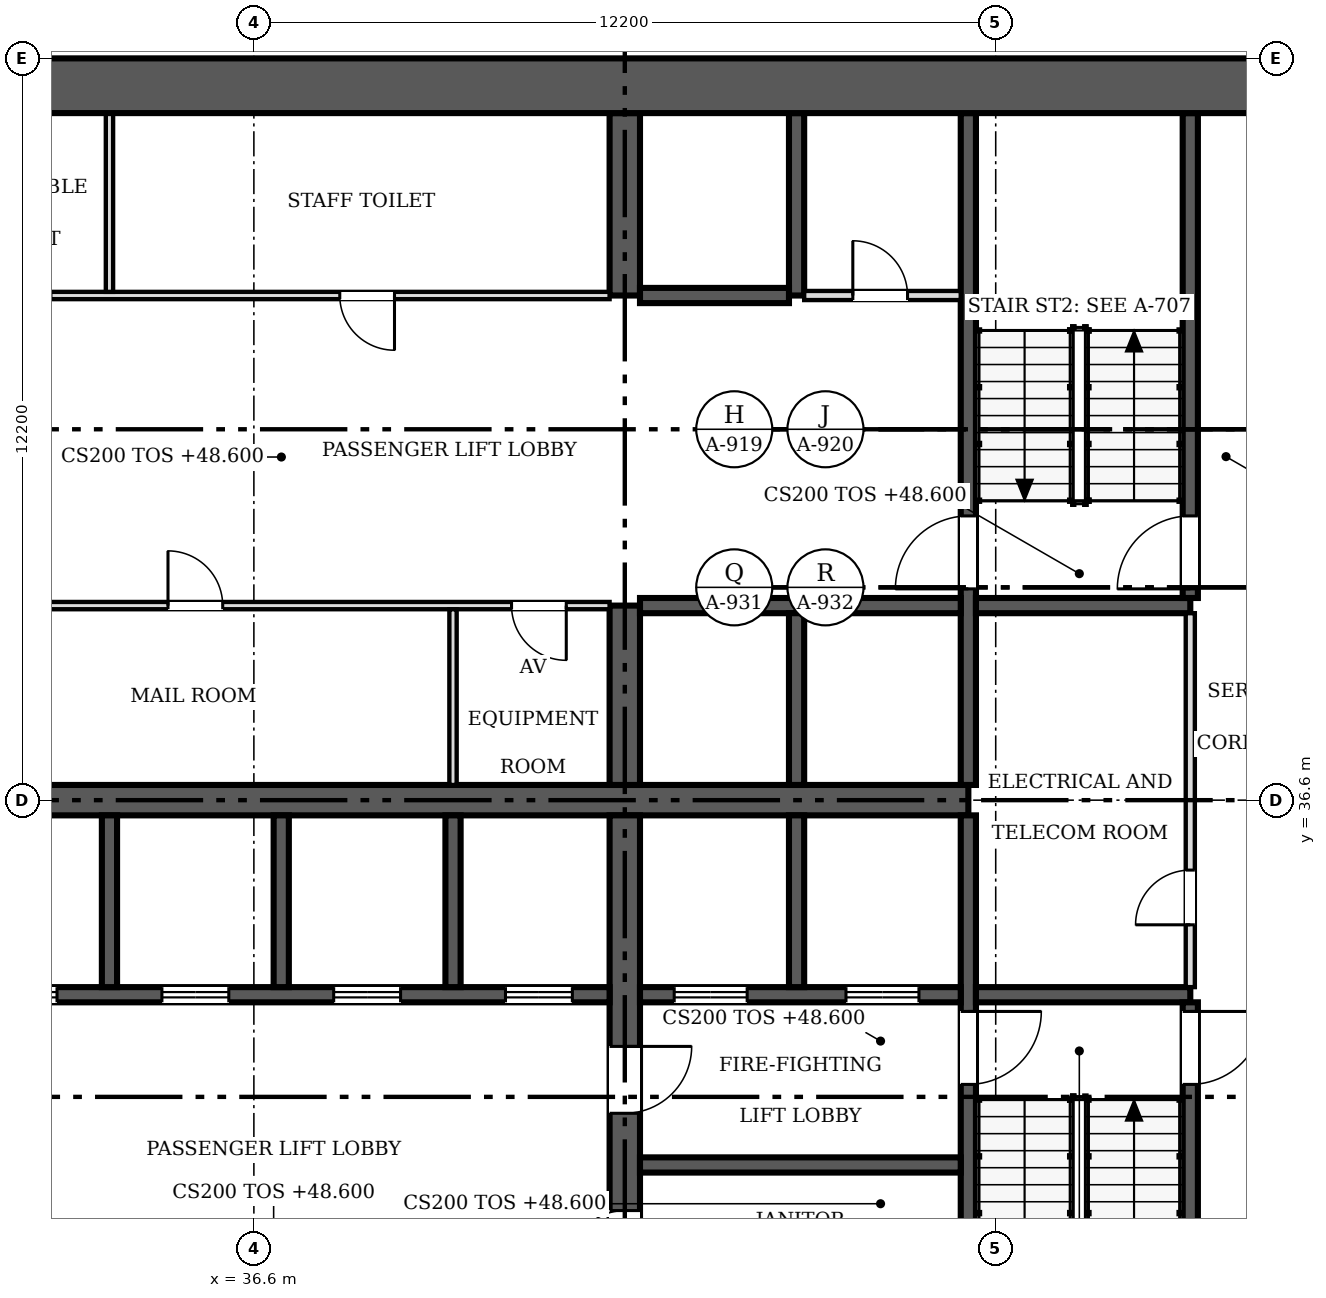
"""IFC4 building model, lengths in metres.
Left out: names, types, materials, properties, quantities, classifications, styles, units other than length and angle.
Written with IfcOpenShell. Run it as: python <this file> out.ifc"""

import sys

from ifc_helpers import new_model, si_unit, direction, frame, frame_2d, origin, place, context, subcontext, project, spatial, rectangle, extrude, source, transform, mapped, element, fill, save


model = new_model("IFC4")
c1 = context("Model", 3, precision=1e-05, world=origin(), true_north=direction((0.0, 1.0)))
c2 = subcontext(c1, "Body", "Model", "MODEL_VIEW")
j1 = project(units=[si_unit("LENGTHUNIT", "METRE"), si_unit("PLANEANGLEUNIT", "RADIAN")], contexts=[c1])
p1 = place(None, origin())
s1 = spatial("IfcSite", under=j1, at=p1, CompositionType="ELEMENT")
p2 = place(p1, origin())
s2 = spatial("IfcBuilding", under=s1, at=p2, CompositionType="ELEMENT")
p3 = place(p2, frame((0.0, 0.0, 48.6)))
s3 = spatial("IfcBuildingStorey", under=s2, at=p3, CompositionType="ELEMENT", Elevation=48.6)
p4 = place(p3, frame((30.5, 48.35, 0.0), z_axis=(0.0, 0.0, 1.0), x_axis=(1.0, 0.0, 0.0)))
e1 = element("IfcWall", 1, at=p4, inside=s3, PredefinedType="SHEAR", context=c2, shape_type="SweptSolid", body=[
    extrude(rectangle(XDim=24.4, YDim=0.9, at=frame_2d((12.2, 0.0))), origin(), (0.0, 0.0, 1.0), 3.8),
])
p5 = place(p3, frame((31.4, 36.6, 0.0), z_axis=(0.0, 0.0, 1.0), x_axis=(1.0, 0.0, 0.0)))
e2 = element("IfcWall", 2, at=p5, inside=s3, PredefinedType="SHEAR", context=c2, shape_type="SweptSolid", body=[
    extrude(rectangle(XDim=16.95, YDim=0.5, at=frame_2d((8.475, 0.0))), origin(), (0.0, 0.0, 1.0), 3.8),
])
p6 = place(p3, frame((42.7, 36.35, 0.0), z_axis=(0.0, 0.0, 1.0), x_axis=(0.0, -1.0, 0.0)))
e3 = element("IfcWall", 3, at=p6, inside=s3, PredefinedType="SHEAR", context=c2, shape_type="SweptSolid", body=[
    extrude(rectangle(XDim=11.05, YDim=0.5, at=frame_2d((5.525, 0.0))), origin(), (0.0, 0.0, 1.0), 3.8),
])
m1 = source(origin(), c2, "Body", "SweptSolid", [
    extrude(rectangle(XDim=0.9, YDim=2.1, at=frame_2d((0.45, 1.05))), frame((0.0, 0.26, 0.0), z_axis=(0.0, -1.0, 0.0), x_axis=(1.0, 0.0, 0.0)), (0.0, 0.0, 1.0), 0.52),
])
p7 = place(p6, frame((6.5, 0.0, 0.0)))
e4 = element("IfcOpeningElement", 4, at=p7, cuts=e3, PredefinedType="OPENING", context=c2, shape_type="MappedRepresentation", body=[
    mapped(m1, transform((0.0, 0.0, 0.0), scale=1.0)),
])
m2 = source(origin(), c2, "Body", "SweptSolid", [
    extrude(rectangle(XDim=1.1, YDim=2.1, at=frame_2d((0.55, 1.05))), frame((0.0, 0.26, 0.0), z_axis=(0.0, -1.0, 0.0), x_axis=(1.0, 0.0, 0.0)), (0.0, 0.0, 1.0), 0.52),
])
p8 = place(p6, frame((3.8, 0.0, 0.0)))
e5 = element("IfcOpeningElement", 5, at=p8, cuts=e3, PredefinedType="OPENING", context=c2, shape_type="MappedRepresentation", body=[
    mapped(m2, transform((0.0, 0.0, 0.0), scale=1.0)),
])
p9 = place(p3, frame((42.7, 36.85, 0.0), z_axis=(0.0, 0.0, 1.0), x_axis=(0.0, 1.0, 0.0)))
e6 = element("IfcWall", 6, at=p9, inside=s3, PredefinedType="SHEAR", context=c2, shape_type="SweptSolid", body=[
    extrude(rectangle(XDim=2.95, YDim=0.5, at=frame_2d((1.475, 0.0))), origin(), (0.0, 0.0, 1.0), 3.8),
])
p10 = place(p3, frame((42.7, 44.9, 0.0), z_axis=(0.0, 0.0, 1.0), x_axis=(0.0, 1.0, 0.0)))
e7 = element("IfcWall", 7, at=p10, inside=s3, PredefinedType="SHEAR", context=c2, shape_type="SweptSolid", body=[
    extrude(rectangle(XDim=3.0, YDim=0.5, at=frame_2d((1.5, 0.0))), origin(), (0.0, 0.0, 1.0), 3.8),
])
p11 = place(p3, frame((48.35, 36.35, 0.0), z_axis=(0.0, 0.0, 1.0), x_axis=(0.0, -1.0, 0.0)))
e8 = element("IfcWall", 8, at=p11, inside=s3, PredefinedType="SOLIDWALL", context=c2, shape_type="SweptSolid", body=[
    extrude(rectangle(XDim=11.05, YDim=0.25, at=frame_2d((5.525, 0.0))), origin(), (0.0, 0.0, 1.0), 3.8),
])
m3 = source(origin(), c2, "Body", "SweptSolid", [
    extrude(rectangle(XDim=1.2, YDim=2.1, at=frame_2d((0.6, 1.05))), frame((0.0, 0.135, 0.0), z_axis=(0.0, -1.0, 0.0), x_axis=(1.0, 0.0, 0.0)), (0.0, 0.0, 1.0), 0.27),
])
p12 = place(p11, frame((3.225, 0.0, 0.0)))
e9 = element("IfcOpeningElement", 9, at=p12, cuts=e8, PredefinedType="OPENING", context=c2, shape_type="MappedRepresentation", body=[
    mapped(m3, transform((0.0, 0.0, 0.0), scale=1.0)),
])
p13 = place(p3, frame((48.35, 47.9, 0.0), z_axis=(0.0, 0.0, 1.0), x_axis=(0.0, -1.0, 0.0)))
e10 = element("IfcWall", 10, at=p13, inside=s3, PredefinedType="SOLIDWALL", context=c2, shape_type="SweptSolid", body=[
    extrude(rectangle(XDim=11.05, YDim=0.25, at=frame_2d((5.525, 0.0))), origin(), (0.0, 0.0, 1.0), 3.8),
])
p14 = place(p13, frame((6.625, 0.0, 0.0)))
e11 = element("IfcOpeningElement", 11, at=p14, cuts=e10, PredefinedType="OPENING", context=c2, shape_type="MappedRepresentation", body=[
    mapped(m3, transform((0.0, 0.0, 0.0), scale=1.0)),
])
p15 = place(p3, frame((42.45, 33.4, 0.0), z_axis=(0.0, 0.0, 1.0), x_axis=(-1.0, 0.0, 0.0)))
e12 = element("IfcWall", 12, at=p15, inside=s3, PredefinedType="SOLIDWALL", context=c2, shape_type="SweptSolid", body=[
    extrude(rectangle(XDim=11.05, YDim=0.25, at=frame_2d((5.525, 0.0))), origin(), (0.0, 0.0, 1.0), 3.8),
])
m4 = source(origin(), c2, "Body", "SweptSolid", [
    extrude(rectangle(XDim=1.1, YDim=2.1, at=frame_2d((0.55, 1.05))), frame((0.0, 0.135, 0.0), z_axis=(0.0, -1.0, 0.0), x_axis=(1.0, 0.0, 0.0)), (0.0, 0.0, 1.0), 0.27),
])
p16 = place(p15, frame((9.087, 0.0, 0.0)))
e13 = element("IfcOpeningElement", 13, at=p16, cuts=e12, PredefinedType="OPENING", context=c2, shape_type="MappedRepresentation", body=[
    mapped(m4, transform((0.0, 0.0, 0.0), scale=1.0)),
])
p17 = place(p15, frame((6.262, 0.0, 0.0)))
e14 = element("IfcOpeningElement", 14, at=p17, cuts=e12, PredefinedType="OPENING", context=c2, shape_type="MappedRepresentation", body=[
    mapped(m4, transform((0.0, 0.0, 0.0), scale=1.0)),
])
p18 = place(p15, frame((3.438, 0.0, 0.0)))
e15 = element("IfcOpeningElement", 15, at=p18, cuts=e12, PredefinedType="OPENING", context=c2, shape_type="MappedRepresentation", body=[
    mapped(m4, transform((0.0, 0.0, 0.0), scale=1.0)),
])
p19 = place(p15, frame((0.613, 0.0, 0.0)))
e16 = element("IfcOpeningElement", 16, at=p19, cuts=e12, PredefinedType="OPENING", context=c2, shape_type="MappedRepresentation", body=[
    mapped(m4, transform((0.0, 0.0, 0.0), scale=1.0)),
])
p20 = place(p3, frame((48.225, 33.4, 0.0), z_axis=(0.0, 0.0, 1.0), x_axis=(-1.0, 0.0, 0.0)))
e17 = element("IfcWall", 17, at=p20, inside=s3, PredefinedType="SOLIDWALL", context=c2, shape_type="SweptSolid", body=[
    extrude(rectangle(XDim=5.275, YDim=0.25, at=frame_2d((2.638, 0.0))), origin(), (0.0, 0.0, 1.0), 3.8),
])
p21 = place(p20, frame((3.512, 0.0, 0.0)))
e18 = element("IfcOpeningElement", 18, at=p21, cuts=e17, PredefinedType="OPENING", context=c2, shape_type="MappedRepresentation", body=[
    mapped(m3, transform((0.0, 0.0, 0.0), scale=1.0)),
])
p22 = place(p20, frame((0.688, 0.0, 0.0)))
e19 = element("IfcOpeningElement", 19, at=p22, cuts=e17, PredefinedType="OPENING", context=c2, shape_type="MappedRepresentation", body=[
    mapped(m3, transform((0.0, 0.0, 0.0), scale=1.0)),
])
p23 = place(p3, frame((48.475, 33.4, 0.0), z_axis=(0.0, 0.0, 1.0), x_axis=(1.0, 0.0, 0.0)))
e20 = element("IfcWall", 20, at=p23, inside=s3, PredefinedType="SOLIDWALL", context=c2, shape_type="SweptSolid", body=[
    extrude(rectangle(XDim=3.525, YDim=0.25, at=frame_2d((1.762, 0.0))), origin(), (0.0, 0.0, 1.0), 3.8),
])
p24 = place(p3, frame((42.95, 39.8, 0.0), z_axis=(0.0, 0.0, 1.0), x_axis=(1.0, 0.0, 0.0)))
e21 = element("IfcWall", 21, at=p24, inside=s3, PredefinedType="SOLIDWALL", context=c2, shape_type="SweptSolid", body=[
    extrude(rectangle(XDim=5.275, YDim=0.25, at=frame_2d((2.638, 0.0))), origin(), (0.0, 0.0, 1.0), 3.8),
])
p25 = place(p3, frame((48.475, 39.8, 0.0), z_axis=(0.0, 0.0, 1.0), x_axis=(1.0, 0.0, 0.0)))
e22 = element("IfcWall", 22, at=p25, inside=s3, PredefinedType="SOLIDWALL", context=c2, shape_type="SweptSolid", body=[
    extrude(rectangle(XDim=3.525, YDim=0.25, at=frame_2d((1.762, 0.0))), origin(), (0.0, 0.0, 1.0), 3.8),
])
p26 = place(p3, frame((52.0, 25.3, 0.0), z_axis=(0.0, 0.0, 1.0), x_axis=(0.0, 1.0, 0.0)))
e23 = element("IfcWall", 23, at=p26, inside=s3, PredefinedType="SOLIDWALL", context=c2, shape_type="SweptSolid", body=[
    extrude(rectangle(XDim=7.975, YDim=0.25, at=frame_2d((3.987, 0.0))), origin(), (0.0, 0.0, 1.0), 3.8),
])
p27 = place(p26, frame((6.625, 0.0, 0.0)))
e24 = element("IfcOpeningElement", 24, at=p27, cuts=e23, PredefinedType="OPENING", context=c2, shape_type="MappedRepresentation", body=[
    mapped(m3, transform((0.0, 0.0, 0.0), scale=1.0)),
])
p28 = place(p3, frame((52.0, 39.925, 0.0), z_axis=(0.0, 0.0, 1.0), x_axis=(0.0, 1.0, 0.0)))
e25 = element("IfcWall", 25, at=p28, inside=s3, PredefinedType="SOLIDWALL", context=c2, shape_type="SweptSolid", body=[
    extrude(rectangle(XDim=7.975, YDim=0.25, at=frame_2d((3.987, 0.0))), origin(), (0.0, 0.0, 1.0), 3.8),
])
p29 = place(p28, frame((0.15, 0.0, 0.0)))
e26 = element("IfcOpeningElement", 26, at=p29, cuts=e25, PredefinedType="OPENING", context=c2, shape_type="MappedRepresentation", body=[
    mapped(m3, transform((0.0, 0.0, 0.0), scale=1.0)),
])
p30 = place(p3, frame((45.525, 33.525, 0.0), z_axis=(0.0, 0.0, 1.0), x_axis=(0.0, 1.0, 0.0)))
e27 = element("IfcWall", 27, at=p30, inside=s3, PredefinedType="SOLIDWALL", context=c2, shape_type="SweptSolid", body=[
    extrude(rectangle(XDim=2.825, YDim=0.25, at=frame_2d((1.413, 0.0))), origin(), (0.0, 0.0, 1.0), 3.8),
])
p31 = place(p3, frame((45.525, 36.85, 0.0), z_axis=(0.0, 0.0, 1.0), x_axis=(0.0, 1.0, 0.0)))
e28 = element("IfcWall", 28, at=p31, inside=s3, PredefinedType="SOLIDWALL", context=c2, shape_type="SweptSolid", body=[
    extrude(rectangle(XDim=2.825, YDim=0.25, at=frame_2d((1.413, 0.0))), origin(), (0.0, 0.0, 1.0), 3.8),
])
p32 = place(p3, frame((42.95, 30.6, 0.0), z_axis=(0.0, 0.0, 1.0), x_axis=(1.0, 0.0, 0.0)))
e29 = element("IfcWall", 29, at=p32, inside=s3, PredefinedType="SOLIDWALL", context=c2, shape_type="SweptSolid", body=[
    extrude(rectangle(XDim=5.275, YDim=0.25, at=frame_2d((2.638, 0.0))), origin(), (0.0, 0.0, 1.0), 3.8),
])
for number, where, z_axis, x_axis in (
    (30, (34.225, 33.525, 0.0), (0.0, 0.0, 1.0), (0.0, 1.0, 0.0)),
    (31, (37.05, 33.525, 0.0), (0.0, 0.0, 1.0), (0.0, 1.0, 0.0)),
    (32, (39.875, 33.525, 0.0), (0.0, 0.0, 1.0), (0.0, 1.0, 0.0)),
):
    element("IfcWall", number, at=place(p3, frame(where, z_axis=z_axis, x_axis=x_axis)), inside=s3, PredefinedType="SOLIDWALL", context=c2, shape_type="SweptSolid", body=[
        extrude(rectangle(XDim=2.825, YDim=0.25, at=frame_2d((1.413, 0.0))), origin(), (0.0, 0.0, 1.0), 3.8),
    ])
p33 = place(p3, frame((45.525, 44.9, 0.0), z_axis=(0.0, 0.0, 1.0), x_axis=(0.0, 1.0, 0.0)))
e33 = element("IfcWall", 33, at=p33, inside=s3, PredefinedType="SOLIDWALL", context=c2, shape_type="SweptSolid", body=[
    extrude(rectangle(XDim=3.0, YDim=0.25, at=frame_2d((1.5, 0.0))), origin(), (0.0, 0.0, 1.0), 3.8),
])
p34 = place(p3, frame((42.95, 44.9, 0.0), z_axis=(0.0, 0.0, 1.0), x_axis=(1.0, 0.0, 0.0)))
e34 = element("IfcWall", 34, at=p34, inside=s3, PredefinedType="SOLIDWALL", context=c2, shape_type="SweptSolid", body=[
    extrude(rectangle(XDim=2.45, YDim=0.25, at=frame_2d((1.225, 0.0))), origin(), (0.0, 0.0, 1.0), 3.8),
])
p35 = place(p3, frame((42.45, 39.8, 0.0), z_axis=(0.0, 0.0, 1.0), x_axis=(-1.0, 0.0, 0.0)))
e35 = element("IfcWall", 35, at=p35, inside=s3, PredefinedType="PARTITIONING", context=c2, shape_type="SweptSolid", body=[
    extrude(rectangle(XDim=11.05, YDim=0.12, at=frame_2d((5.525, 0.0))), origin(), (0.0, 0.0, 1.0), 3.6),
])
m5 = source(origin(), c2, "Body", "SweptSolid", [
    extrude(rectangle(XDim=0.9, YDim=2.1, at=frame_2d((0.45, 1.05))), frame((0.0, 0.07, 0.0), z_axis=(0.0, -1.0, 0.0), x_axis=(1.0, 0.0, 0.0)), (0.0, 0.0, 1.0), 0.14),
])
p36 = place(p35, frame((6.363, 0.0, 0.0)))
e36 = element("IfcOpeningElement", 36, at=p36, cuts=e35, PredefinedType="OPENING", context=c2, shape_type="MappedRepresentation", body=[
    mapped(m5, transform((0.0, 0.0, 0.0), scale=1.0)),
])
p37 = place(p35, frame((0.712, 0.0, 0.0)))
e37 = element("IfcOpeningElement", 37, at=p37, cuts=e35, PredefinedType="OPENING", context=c2, shape_type="MappedRepresentation", body=[
    mapped(m5, transform((0.0, 0.0, 0.0), scale=1.0)),
])
p38 = place(p3, frame((31.4, 44.9, 0.0), z_axis=(0.0, 0.0, 1.0), x_axis=(1.0, 0.0, 0.0)))
e38 = element("IfcWall", 38, at=p38, inside=s3, PredefinedType="PARTITIONING", context=c2, shape_type="SweptSolid", body=[
    extrude(rectangle(XDim=11.05, YDim=0.12, at=frame_2d((5.525, 0.0))), origin(), (0.0, 0.0, 1.0), 3.6),
])
p39 = place(p38, frame((0.962, 0.0, 0.0)))
e39 = element("IfcOpeningElement", 39, at=p39, cuts=e38, PredefinedType="OPENING", context=c2, shape_type="MappedRepresentation", body=[
    mapped(m5, transform((0.0, 0.0, 0.0), scale=1.0)),
])
p40 = place(p38, frame((6.613, 0.0, 0.0)))
e40 = element("IfcOpeningElement", 40, at=p40, cuts=e38, PredefinedType="OPENING", context=c2, shape_type="MappedRepresentation", body=[
    mapped(m5, transform((0.0, 0.0, 0.0), scale=1.0)),
])
p41 = place(p3, frame((52.0, 33.525, 0.0), z_axis=(0.0, 0.0, 1.0), x_axis=(0.0, 1.0, 0.0)))
e41 = element("IfcWall", 41, at=p41, inside=s3, PredefinedType="PARTITIONING", context=c2, shape_type="SweptSolid", body=[
    extrude(rectangle(XDim=6.15, YDim=0.15, at=frame_2d((3.075, 0.0))), origin(), (0.0, 0.0, 1.0), 3.6),
])
m6 = source(origin(), c2, "Body", "SweptSolid", [
    extrude(rectangle(XDim=0.9, YDim=2.1, at=frame_2d((0.45, 1.05))), frame((0.0, 0.085, 0.0), z_axis=(0.0, -1.0, 0.0), x_axis=(1.0, 0.0, 0.0)), (0.0, 0.0, 1.0), 0.17),
])
p42 = place(p41, frame((1.025, 0.0, 0.0)))
e42 = element("IfcOpeningElement", 42, at=p42, cuts=e41, PredefinedType="OPENING", context=c2, shape_type="MappedRepresentation", body=[
    mapped(m6, transform((0.0, 0.0, 0.0), scale=1.0)),
])
p43 = place(p3, frame((39.875, 36.85, 0.0), z_axis=(0.0, 0.0, 1.0), x_axis=(0.0, 1.0, 0.0)))
e43 = element("IfcWall", 43, at=p43, inside=s3, PredefinedType="PARTITIONING", context=c2, shape_type="SweptSolid", body=[
    extrude(rectangle(XDim=2.89, YDim=0.12, at=frame_2d((1.445, 0.0))), origin(), (0.0, 0.0, 1.0), 3.6),
])
p44 = place(p3, frame((34.225, 44.96, 0.0), z_axis=(0.0, 0.0, 1.0), x_axis=(0.0, 1.0, 0.0)))
e44 = element("IfcWall", 44, at=p44, inside=s3, PredefinedType="PARTITIONING", context=c2, shape_type="SweptSolid", body=[
    extrude(rectangle(XDim=2.94, YDim=0.12, at=frame_2d((1.47, 0.0))), origin(), (0.0, 0.0, 1.0), 3.6),
])
p45 = place(p3, frame((45.65, 44.9, 0.0), z_axis=(0.0, 0.0, 1.0), x_axis=(1.0, 0.0, 0.0)))
e45 = element("IfcWall", 45, at=p45, inside=s3, PredefinedType="PARTITIONING", context=c2, shape_type="SweptSolid", body=[
    extrude(rectangle(XDim=2.575, YDim=0.15, at=frame_2d((1.288, 0.0))), origin(), (0.0, 0.0, 1.0), 3.6),
])
p46 = place(p45, frame((0.8, 0.0, 0.0)))
e46 = element("IfcOpeningElement", 46, at=p46, cuts=e45, PredefinedType="OPENING", context=c2, shape_type="MappedRepresentation", body=[
    mapped(m6, transform((0.0, 0.0, 0.0), scale=1.0)),
])
m7 = source(origin(), c2, "Body", "SweptSolid", [
    extrude(rectangle(XDim=0.9, YDim=2.1, at=frame_2d((0.45, 1.05))), frame((0.0, 0.025, 0.0), z_axis=(0.0, -1.0, 0.0), x_axis=(1.0, 0.0, 0.0)), (0.0, 0.0, 1.0), 0.05),
])
p47 = place(p7, origin())
e47 = element("IfcDoor", 47, at=p47, inside=s3, OperationType="SINGLE_SWING_RIGHT", PredefinedType="DOOR", context=c2, shape_type="MappedRepresentation", body=[
    mapped(m7, transform((0.0, 0.0, 0.0), scale=1.0)),
])
fill(e4, e47)
m8 = source(origin(), c2, "Body", "SweptSolid", [
    extrude(rectangle(XDim=1.1, YDim=2.1, at=frame_2d((0.55, 1.05))), frame((0.0, 0.025, 0.0), z_axis=(0.0, -1.0, 0.0), x_axis=(1.0, 0.0, 0.0)), (0.0, 0.0, 1.0), 0.05),
])
p48 = place(p8, origin())
e48 = element("IfcDoor", 48, at=p48, inside=s3, OperationType="SINGLE_SWING_LEFT", PredefinedType="DOOR", context=c2, shape_type="MappedRepresentation", body=[
    mapped(m8, transform((0.0, 0.0, 0.0), scale=1.0)),
])
fill(e5, e48)
m9 = source(origin(), c2, "Body", "SweptSolid", [
    extrude(rectangle(XDim=1.2, YDim=2.1, at=frame_2d((0.6, 1.05))), frame((0.0, 0.025, 0.0), z_axis=(0.0, -1.0, 0.0), x_axis=(1.0, 0.0, 0.0)), (0.0, 0.0, 1.0), 0.05),
])
p49 = place(p12, origin())
e49 = element("IfcDoor", 49, at=p49, inside=s3, OperationType="SINGLE_SWING_LEFT", PredefinedType="DOOR", context=c2, shape_type="MappedRepresentation", body=[
    mapped(m9, transform((0.0, 0.0, 0.0), scale=1.0)),
])
fill(e9, e49)
p50 = place(p14, origin())
e50 = element("IfcDoor", 50, at=p50, inside=s3, OperationType="SINGLE_SWING_RIGHT", PredefinedType="DOOR", context=c2, shape_type="MappedRepresentation", body=[
    mapped(m9, transform((0.0, 0.0, 0.0), scale=1.0)),
])
fill(e11, e50)
p51 = place(p16, origin())
e51 = element("IfcDoor", 51, at=p51, inside=s3, OperationType="DOUBLE_DOOR_SLIDING", PredefinedType="DOOR", context=c2, shape_type="MappedRepresentation", body=[
    mapped(m8, transform((0.0, 0.0, 0.0), scale=1.0)),
])
fill(e13, e51)
p52 = place(p17, origin())
e52 = element("IfcDoor", 52, at=p52, inside=s3, OperationType="DOUBLE_DOOR_SLIDING", PredefinedType="DOOR", context=c2, shape_type="MappedRepresentation", body=[
    mapped(m8, transform((0.0, 0.0, 0.0), scale=1.0)),
])
fill(e14, e52)
p53 = place(p18, origin())
e53 = element("IfcDoor", 53, at=p53, inside=s3, OperationType="DOUBLE_DOOR_SLIDING", PredefinedType="DOOR", context=c2, shape_type="MappedRepresentation", body=[
    mapped(m8, transform((0.0, 0.0, 0.0), scale=1.0)),
])
fill(e15, e53)
p54 = place(p19, origin())
e54 = element("IfcDoor", 54, at=p54, inside=s3, OperationType="DOUBLE_DOOR_SLIDING", PredefinedType="DOOR", context=c2, shape_type="MappedRepresentation", body=[
    mapped(m8, transform((0.0, 0.0, 0.0), scale=1.0)),
])
fill(e16, e54)
p55 = place(p21, origin())
e55 = element("IfcDoor", 55, at=p55, inside=s3, OperationType="DOUBLE_DOOR_SLIDING", PredefinedType="DOOR", context=c2, shape_type="MappedRepresentation", body=[
    mapped(m9, transform((0.0, 0.0, 0.0), scale=1.0)),
])
fill(e18, e55)
p56 = place(p22, origin())
e56 = element("IfcDoor", 56, at=p56, inside=s3, OperationType="DOUBLE_DOOR_SLIDING", PredefinedType="DOOR", context=c2, shape_type="MappedRepresentation", body=[
    mapped(m9, transform((0.0, 0.0, 0.0), scale=1.0)),
])
fill(e19, e56)
p57 = place(p27, origin())
e57 = element("IfcDoor", 57, at=p57, inside=s3, OperationType="SINGLE_SWING_RIGHT", PredefinedType="DOOR", context=c2, shape_type="MappedRepresentation", body=[
    mapped(m9, transform((0.0, 0.0, 0.0), scale=1.0)),
])
fill(e24, e57)
p58 = place(p29, origin())
e58 = element("IfcDoor", 58, at=p58, inside=s3, OperationType="SINGLE_SWING_LEFT", PredefinedType="DOOR", context=c2, shape_type="MappedRepresentation", body=[
    mapped(m9, transform((0.0, 0.0, 0.0), scale=1.0)),
])
fill(e26, e58)
p59 = place(p36, origin())
e59 = element("IfcDoor", 59, at=p59, inside=s3, OperationType="SINGLE_SWING_RIGHT", PredefinedType="DOOR", context=c2, shape_type="MappedRepresentation", body=[
    mapped(m7, transform((0.0, 0.0, 0.0), scale=1.0)),
])
fill(e36, e59)
p60 = place(p37, origin())
e60 = element("IfcDoor", 60, at=p60, inside=s3, OperationType="SINGLE_SWING_LEFT", PredefinedType="DOOR", context=c2, shape_type="MappedRepresentation", body=[
    mapped(m7, transform((0.0, 0.0, 0.0), scale=1.0)),
])
fill(e37, e60)
p61 = place(p40, origin())
e61 = element("IfcDoor", 61, at=p61, inside=s3, OperationType="SINGLE_SWING_RIGHT", PredefinedType="DOOR", context=c2, shape_type="MappedRepresentation", body=[
    mapped(m7, transform((0.0, 0.0, 0.0), scale=1.0)),
])
fill(e40, e61)
p62 = place(p42, origin())
e62 = element("IfcDoor", 62, at=p62, inside=s3, OperationType="SINGLE_SWING_LEFT", PredefinedType="DOOR", context=c2, shape_type="MappedRepresentation", body=[
    mapped(m7, transform((0.0, 0.0, 0.0), scale=1.0)),
])
fill(e42, e62)
p63 = place(p46, origin())
e63 = element("IfcDoor", 63, at=p63, inside=s3, OperationType="SINGLE_SWING_LEFT", PredefinedType="DOOR", context=c2, shape_type="MappedRepresentation", body=[
    mapped(m7, transform((0.0, 0.0, 0.0), scale=1.0)),
])
fill(e46, e63)
save(model, sys.argv[1])
